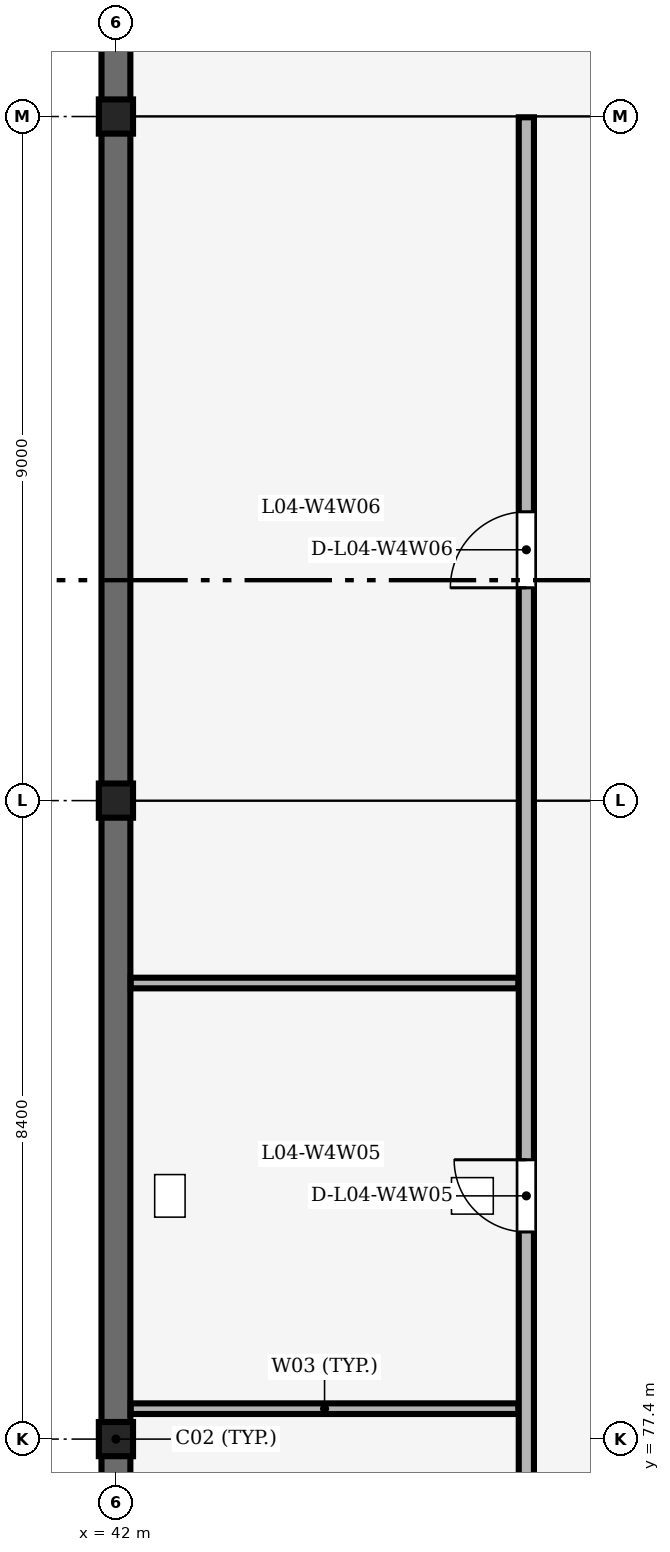
"""IFC4 building model, lengths in metres.
Left out: names, types, materials, properties, quantities, classifications, styles, units other than length and angle.
Written with IfcOpenShell. Run it as: python <this file> out.ifc"""

import sys

from ifc_helpers import new_model, si_unit, direction, frame, frame_2d, origin, origin_2d, place, context, subcontext, project, spatial, rectangle, extrude, element, fill, save


model = new_model("IFC4")
c1 = context("Model", 3, precision=1e-05, world=origin(), true_north=direction((0.0, 1.0)))
c2 = subcontext(c1, "Body", "Model", "MODEL_VIEW")
j1 = project(units=[si_unit("LENGTHUNIT", "METRE"), si_unit("PLANEANGLEUNIT", "RADIAN")], contexts=[c1])
p1 = place(None, origin())
s1 = spatial("IfcSite", under=j1, at=p1, CompositionType="ELEMENT")
p2 = place(p1, origin())
s2 = spatial("IfcBuilding", under=s1, at=p2, CompositionType="ELEMENT")
p3 = place(p2, frame((0.0, 0.0, 17.4)))
s3 = spatial("IfcBuildingStorey", under=s2, at=p3, CompositionType="ELEMENT", Elevation=17.4)
for number, where, z_axis, x_axis in (
    (1, (42.0, 77.4, 0.0), (0.0, 0.0, 1.0), (1.0, 0.0, 0.0)),
    (2, (42.0, 85.8, 0.0), (0.0, 0.0, 1.0), (1.0, 0.0, 0.0)),
    (3, (42.0, 94.8, 0.0), (0.0, 0.0, 1.0), (1.0, 0.0, 0.0)),
):
    element("IfcColumn", number, at=place(p3, frame(where, z_axis=z_axis, x_axis=x_axis)), inside=s3, PredefinedType="COLUMN", context=c2, shape_type="SweptSolid", body=[
        extrude(rectangle(XDim=0.45, YDim=0.45, at=origin_2d()), origin(), (0.0, 0.0, 1.0), 4.2),
    ])
p4 = place(p3, frame((42.0, 95.0, 0.0), z_axis=(0.0, 0.0, 1.0), x_axis=(0.0, 1.0, 0.0)))
e4 = element("IfcWall", 4, at=p4, inside=s3, PredefinedType="SHEAR", context=c2, shape_type="SweptSolid", body=[
    extrude(rectangle(XDim=8.6, YDim=0.38, at=frame_2d((4.3, 0.0))), origin(), (0.0, 0.0, 1.0), 3.19),
])
p5 = place(p3, frame((42.0, 86.0, 0.0), z_axis=(0.0, 0.0, 1.0), x_axis=(0.0, 1.0, 0.0)))
e5 = element("IfcWall", 5, at=p5, inside=s3, PredefinedType="SHEAR", context=c2, shape_type="SweptSolid", body=[
    extrude(rectangle(XDim=8.6, YDim=0.38, at=frame_2d((4.3, 0.0))), origin(), (0.0, 0.0, 1.0), 3.24),
])
p6 = place(p3, frame((42.0, 69.2, 0.0), z_axis=(0.0, 0.0, 1.0), x_axis=(0.0, 1.0, 0.0)))
e6 = element("IfcWall", 6, at=p6, inside=s3, PredefinedType="SHEAR", context=c2, shape_type="SweptSolid", body=[
    extrude(rectangle(XDim=8.0, YDim=0.38, at=frame_2d((4.0, 0.0))), origin(), (0.0, 0.0, 1.0), 3.24),
])
p7 = place(p3, frame((42.0, 77.6, 0.0), z_axis=(0.0, 0.0, 1.0), x_axis=(0.0, 1.0, 0.0)))
e7 = element("IfcWall", 7, at=p7, inside=s3, PredefinedType="SHEAR", context=c2, shape_type="SweptSolid", body=[
    extrude(rectangle(XDim=8.0, YDim=0.38, at=frame_2d((4.0, 0.0))), origin(), (0.0, 0.0, 1.0), 3.29),
])
p8 = place(p3, frame((42.195, 77.8, 0.0), z_axis=(0.0, 0.0, 1.0), x_axis=(1.0, 0.0, 0.0)))
e8 = element("IfcWall", 8, at=p8, inside=s3, PredefinedType="PARTITIONING", context=c2, shape_type="SweptSolid", body=[
    extrude(rectangle(XDim=5.1, YDim=0.14, at=frame_2d((2.55, 0.0))), origin(), (0.0, 0.0, 1.0), 3.19),
])
p9 = place(p3, frame((42.195, 83.4, 0.0), z_axis=(0.0, 0.0, 1.0), x_axis=(1.0, 0.0, 0.0)))
e9 = element("IfcWall", 9, at=p9, inside=s3, PredefinedType="PARTITIONING", context=c2, shape_type="SweptSolid", body=[
    extrude(rectangle(XDim=5.1, YDim=0.14, at=frame_2d((2.55, 0.0))), origin(), (0.0, 0.0, 1.0), 3.9),
])
p10 = place(p3, frame((47.4, 43.965, 0.0), z_axis=(0.0, 0.0, 1.0), x_axis=(0.0, 1.0, 0.0)))
e10 = element("IfcWall", 10, at=p10, inside=s3, PredefinedType="PARTITIONING", context=c2, shape_type="SweptSolid", body=[
    extrude(rectangle(XDim=50.825, YDim=0.2, at=frame_2d((25.413, 0.0))), origin(), (0.0, 0.0, 1.0), 3.9),
])
p11 = place(p10, frame((5.035, 0.0, 0.0)))
e11 = element("IfcOpeningElement", 11, at=p11, cuts=e10, PredefinedType="OPENING", context=c2, shape_type="SweptSolid", body=[
    extrude(rectangle(XDim=1.0, YDim=2.15, at=frame_2d((0.5, 1.075))), frame((0.0, 0.11, 0.0), z_axis=(0.0, -1.0, 0.0), x_axis=(1.0, 0.0, 0.0)), (0.0, 0.0, 1.0), 0.22),
])
p12 = place(p10, frame((16.435, 0.0, 0.0)))
e12 = element("IfcOpeningElement", 12, at=p12, cuts=e10, PredefinedType="OPENING", context=c2, shape_type="SweptSolid", body=[
    extrude(rectangle(XDim=1.0, YDim=2.15, at=frame_2d((0.5, 1.075))), frame((0.0, 0.11, 0.0), z_axis=(0.0, -1.0, 0.0), x_axis=(1.0, 0.0, 0.0)), (0.0, 0.0, 1.0), 0.22),
])
p13 = place(p10, frame((24.96, 0.0, 0.0)))
e13 = element("IfcOpeningElement", 13, at=p13, cuts=e10, PredefinedType="OPENING", context=c2, shape_type="SweptSolid", body=[
    extrude(rectangle(XDim=0.95, YDim=2.2, at=frame_2d((0.475, 1.1))), frame((0.0, 0.11, 0.0), z_axis=(0.0, -1.0, 0.0), x_axis=(1.0, 0.0, 0.0)), (0.0, 0.0, 1.0), 0.22),
])
p14 = place(p10, frame((30.56, 0.0, 0.0)))
e14 = element("IfcOpeningElement", 14, at=p14, cuts=e10, PredefinedType="OPENING", context=c2, shape_type="SweptSolid", body=[
    extrude(rectangle(XDim=0.95, YDim=2.2, at=frame_2d((0.475, 1.1))), frame((0.0, 0.11, 0.0), z_axis=(0.0, -1.0, 0.0), x_axis=(1.0, 0.0, 0.0)), (0.0, 0.0, 1.0), 0.22),
])
p15 = place(p10, frame((36.16, 0.0, 0.0)))
e15 = element("IfcOpeningElement", 15, at=p15, cuts=e10, PredefinedType="OPENING", context=c2, shape_type="SweptSolid", body=[
    extrude(rectangle(XDim=0.95, YDim=2.1, at=frame_2d((0.475, 1.05))), frame((0.0, 0.11, 0.0), z_axis=(0.0, -1.0, 0.0), x_axis=(1.0, 0.0, 0.0)), (0.0, 0.0, 1.0), 0.22),
])
p16 = place(p10, frame((44.635, 0.0, 0.0)))
e16 = element("IfcOpeningElement", 16, at=p16, cuts=e10, PredefinedType="OPENING", context=c2, shape_type="SweptSolid", body=[
    extrude(rectangle(XDim=1.0, YDim=2.15, at=frame_2d((0.5, 1.075))), frame((0.0, 0.11, 0.0), z_axis=(0.0, -1.0, 0.0), x_axis=(1.0, 0.0, 0.0)), (0.0, 0.0, 1.0), 0.22),
])
p17 = place(p15, origin())
e17 = element("IfcDoor", 17, at=p17, inside=s3, OperationType="SINGLE_SWING_RIGHT", PredefinedType="DOOR", context=c2, shape_type="SweptSolid", body=[
    extrude(rectangle(XDim=0.95, YDim=2.1, at=frame_2d((0.475, 1.05))), frame((0.0, 0.025, 0.0), z_axis=(0.0, -1.0, 0.0), x_axis=(1.0, 0.0, 0.0)), (0.0, 0.0, 1.0), 0.05),
])
fill(e15, e17)
p18 = place(p16, origin())
e18 = element("IfcDoor", 18, at=p18, inside=s3, OperationType="SINGLE_SWING_LEFT", PredefinedType="DOOR", context=c2, shape_type="SweptSolid", body=[
    extrude(rectangle(XDim=1.0, YDim=2.15, at=frame_2d((0.5, 1.075))), frame((0.0, 0.025, 0.0), z_axis=(0.0, -1.0, 0.0), x_axis=(1.0, 0.0, 0.0)), (0.0, 0.0, 1.0), 0.05),
])
fill(e16, e18)
save(model, sys.argv[1])
